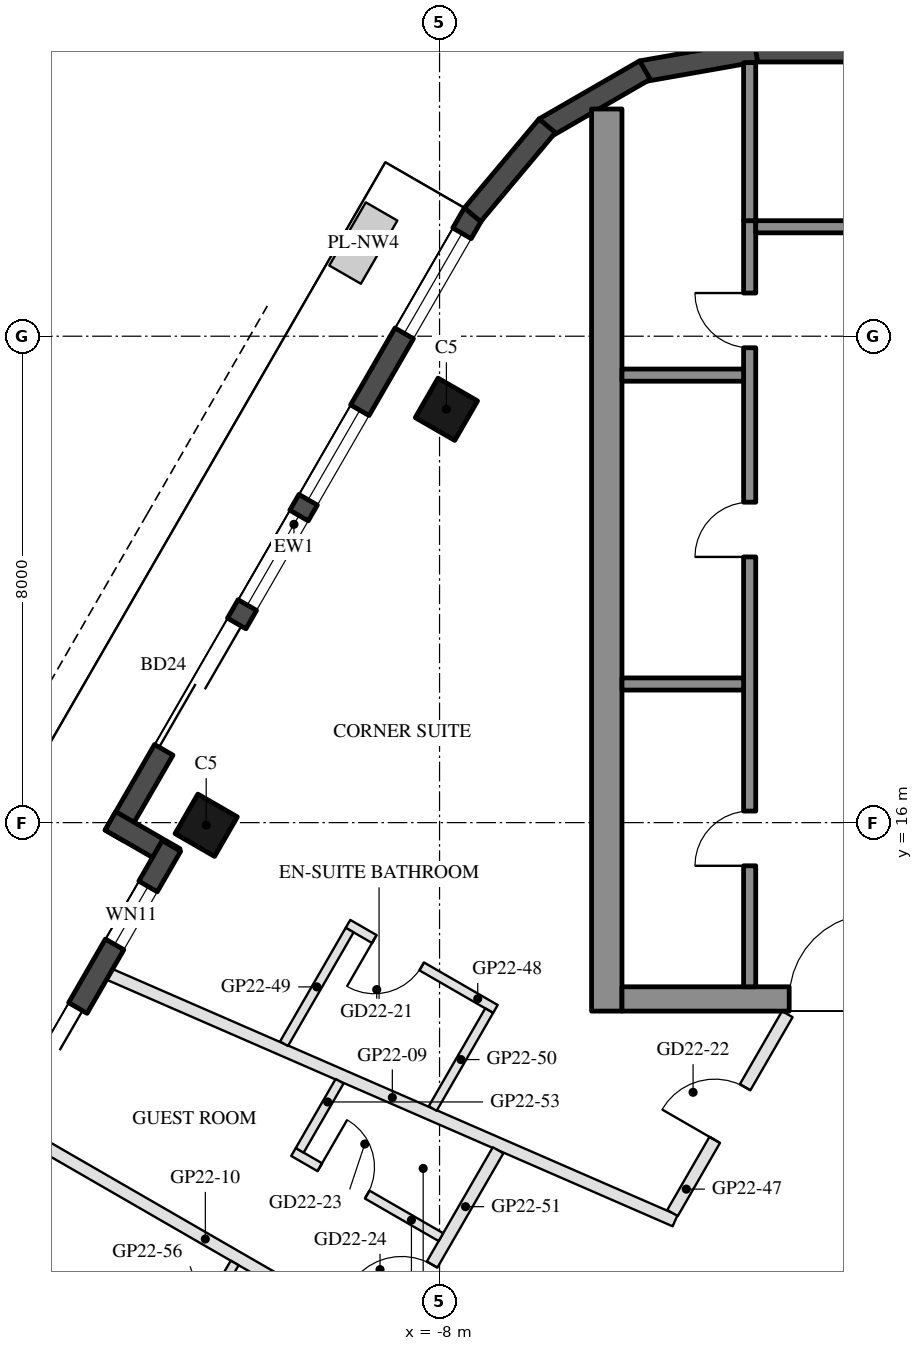
"""IFC4 building model, lengths in metres.
Left out: names, types, materials, properties, quantities, classifications, styles, units other than length and angle.
Written with IfcOpenShell. Run it as: python <this file> out.ifc"""

import sys

from ifc_helpers import new_model, si_unit, direction, frame, frame_2d, origin, origin_2d, place, context, subcontext, project, spatial, rectangle, hollow_rectangle, extrude, element, fill, save


model = new_model("IFC4")
c1 = context("Model", 3, precision=1e-05, world=origin(), true_north=direction((0.0, 1.0)))
c2 = subcontext(c1, "Body", "Model", "MODEL_VIEW")
j1 = project(units=[si_unit("LENGTHUNIT", "METRE"), si_unit("PLANEANGLEUNIT", "RADIAN")], contexts=[c1])
p1 = place(None, origin())
s1 = spatial("IfcSite", under=j1, at=p1, CompositionType="ELEMENT")
p2 = place(p1, origin())
s2 = spatial("IfcBuilding", under=s1, at=p2, CompositionType="ELEMENT")
p3 = place(p2, frame((0.0, 0.0, 224.3)))
s3 = spatial("IfcBuildingStorey", under=s2, at=p3, CompositionType="ELEMENT", Elevation=224.3)
for number, where, z_axis, x_axis in (
    (1, (-7.888, 22.798, 0.0), (0.0, 0.0, 1.0), (0.5, 0.866, 0.0)),
    (2, (-11.838, 15.957, 0.0), (0.0, 0.0, 1.0), (0.5, 0.866, 0.0)),
):
    element("IfcColumn", number, at=place(p3, frame(where, z_axis=z_axis, x_axis=x_axis)), inside=s3, PredefinedType="COLUMN", context=c2, shape_type="SweptSolid", body=[
        extrude(hollow_rectangle(XDim=0.75, YDim=0.75, WallThickness=0.035, at=origin_2d()), origin(), (0.0, 0.0, 1.0), 3.7),
    ])
p4 = place(p3, frame((-7.441, 26.022, 0.0), z_axis=(0.0, 0.0, 1.0), x_axis=(-0.499992533062, -0.86602971478, 0.0)))
e3 = element("IfcWall", 3, at=p4, inside=s3, PredefinedType="SOLIDWALL", context=c2, shape_type="SweptSolid", body=[
    extrude(rectangle(XDim=11.816, YDim=0.35, at=frame_2d((5.908, 0.0))), origin(), (0.0, 0.0, 1.0), 3.55),
])
p5 = place(p4, frame((0.381, 0.0, 0.3)))
e4 = element("IfcOpeningElement", 4, at=p5, cuts=e3, PredefinedType="OPENING", context=c2, shape_type="SweptSolid", body=[
    extrude(rectangle(XDim=1.9, YDim=2.65, at=frame_2d((0.95, 1.325))), frame((0.0, 0.185, 0.0), z_axis=(0.0, -1.0, 0.0), x_axis=(1.0, 0.0, 0.0)), (0.0, 0.0, 1.0), 0.37),
])
p6 = place(p4, frame((7.791, 0.0, 0.0)))
e5 = element("IfcOpeningElement", 5, at=p6, cuts=e3, PredefinedType="OPENING", context=c2, shape_type="SweptSolid", body=[
    extrude(rectangle(XDim=2.4, YDim=2.4, at=frame_2d((1.2, 1.2))), frame((0.0, 0.185, 0.0), z_axis=(0.0, -1.0, 0.0), x_axis=(1.0, 0.0, 0.0)), (0.0, 0.0, 1.0), 0.37),
])
p7 = place(p4, frame((3.741, 0.0, 0.3)))
e6 = element("IfcOpeningElement", 6, at=p7, cuts=e3, PredefinedType="OPENING", context=c2, shape_type="SweptSolid", body=[
    extrude(rectangle(XDim=1.7, YDim=2.65, at=frame_2d((0.85, 1.325))), frame((0.0, 0.185, 0.0), z_axis=(0.0, -1.0, 0.0), x_axis=(1.0, 0.0, 0.0)), (0.0, 0.0, 1.0), 0.37),
])
p8 = place(p4, frame((5.741, 0.0, 0.3)))
e7 = element("IfcOpeningElement", 7, at=p8, cuts=e3, PredefinedType="OPENING", context=c2, shape_type="SweptSolid", body=[
    extrude(rectangle(XDim=1.7, YDim=2.65, at=frame_2d((0.85, 1.325))), frame((0.0, 0.185, 0.0), z_axis=(0.0, -1.0, 0.0), x_axis=(1.0, 0.0, 0.0)), (0.0, 0.0, 1.0), 0.37),
])
p9 = place(p3, frame((-13.413, 16.029, 0.0), z_axis=(0.0, 0.0, 1.0), x_axis=(0.866005645448, -0.500034220881, 0.0)))
e8 = element("IfcWall", 8, at=p9, inside=s3, PredefinedType="SOLIDWALL", context=c2, shape_type="SweptSolid", body=[
    extrude(rectangle(XDim=1.22, YDim=0.35, at=frame_2d((0.61, 0.0))), origin(), (0.0, 0.0, 1.0), 3.55),
])
p10 = place(p3, frame((-12.409, 15.617, 0.0), z_axis=(0.0, 0.0, 1.0), x_axis=(-0.500003597184, -0.866023326939, 0.0)))
e9 = element("IfcWall", 9, at=p10, inside=s3, PredefinedType="SOLIDWALL", context=c2, shape_type="SweptSolid", body=[
    extrude(rectangle(XDim=6.74, YDim=0.35, at=frame_2d((3.37, 0.0))), origin(), (0.0, 0.0, 1.0), 3.55),
])
p11 = place(p10, frame((0.77, 0.0, 0.3)))
e10 = element("IfcOpeningElement", 10, at=p11, cuts=e9, PredefinedType="OPENING", context=c2, shape_type="SweptSolid", body=[
    extrude(rectangle(XDim=1.1, YDim=2.65, at=frame_2d((0.55, 1.325))), frame((0.0, 0.185, 0.0), z_axis=(0.0, -1.0, 0.0), x_axis=(1.0, 0.0, 0.0)), (0.0, 0.0, 1.0), 0.37),
])
p12 = place(p10, frame((3.079, 0.0, 0.0)))
e11 = element("IfcOpeningElement", 11, at=p12, cuts=e9, PredefinedType="OPENING", context=c2, shape_type="SweptSolid", body=[
    extrude(rectangle(XDim=1.5, YDim=2.4, at=frame_2d((0.75, 1.2))), frame((0.0, 0.185, 0.0), z_axis=(0.0, -1.0, 0.0), x_axis=(1.0, 0.0, 0.0)), (0.0, 0.0, 1.0), 0.37),
])
p13 = place(p3, frame((2.829, 28.685, 0.0), z_axis=(0.0, 0.0, 1.0), x_axis=(-1.0, 0.0, 0.0)))
e12 = element("IfcWall", 12, at=p13, inside=s3, PredefinedType="SOLIDWALL", context=c2, shape_type="SweptSolid", body=[
    extrude(rectangle(XDim=5.658, YDim=0.35, at=frame_2d((2.829, 0.0))), origin(), (0.0, 0.0, 1.0), 3.55),
])
for number, where, z_axis, x_axis in (
    (13, (-2.799, 28.688, 0.0), (0.0, 0.0, 1.0), (-0.985, -0.174, 0.0)),
    (14, (-4.623, 28.377, 0.0), (0.0, 0.0, 1.0), (-0.866, -0.5, 0.0)),
):
    element("IfcWall", number, at=place(p3, frame(where, z_axis=z_axis, x_axis=x_axis)), inside=s3, PredefinedType="SOLIDWALL", context=c2, shape_type="SweptSolid", body=[
        extrude(rectangle(XDim=1.91, YDim=0.35, at=frame_2d((0.955, 0.0))), origin(), (0.0, 0.0, 1.0), 3.55),
    ])
p14 = place(p3, frame((-6.23, 27.461, 0.0), z_axis=(0.0, 0.0, 1.0), x_axis=(-0.642808304945, -0.766027077259, 0.0)))
e15 = element("IfcWall", 15, at=p14, inside=s3, PredefinedType="SOLIDWALL", context=c2, shape_type="SweptSolid", body=[
    extrude(rectangle(XDim=1.91, YDim=0.35, at=frame_2d((0.955, 0.0))), origin(), (0.0, 0.0, 1.0), 3.55),
])
p15 = place(p3, frame((-5.25, 12.9, 0.0), z_axis=(0.0, 0.0, 1.0), x_axis=(0.0, 1.0, 0.0)))
e16 = element("IfcWall", 16, at=p15, inside=s3, PredefinedType="SHEAR", context=c2, shape_type="SweptSolid", body=[
    extrude(rectangle(XDim=14.837, YDim=0.5, at=frame_2d((7.418, 0.0))), origin(), (0.0, 0.0, 1.0), 3.5),
])
p16 = place(p3, frame((5.0, 13.1, 0.0), z_axis=(0.0, 0.0, 1.0), x_axis=(-1.0, 0.0, 0.0)))
e17 = element("IfcWall", 17, at=p16, inside=s3, PredefinedType="SHEAR", context=c2, shape_type="SweptSolid", body=[
    extrude(rectangle(XDim=10.0, YDim=0.4, at=frame_2d((5.0, 0.0))), origin(), (0.0, 0.0, 1.0), 3.5),
])
p17 = place(p16, frame((3.55, 0.0, 0.0)))
e18 = element("IfcOpeningElement", 18, at=p17, cuts=e17, PredefinedType="OPENING", context=c2, shape_type="SweptSolid", body=[
    extrude(rectangle(XDim=1.1, YDim=2.1, at=frame_2d((0.55, 1.05))), frame((0.0, 0.21, 0.0), z_axis=(0.0, -1.0, 0.0), x_axis=(1.0, 0.0, 0.0)), (0.0, 0.0, 1.0), 0.42),
])
p18 = place(p16, frame((5.85, 0.0, 0.0)))
e19 = element("IfcOpeningElement", 19, at=p18, cuts=e17, PredefinedType="OPENING", context=c2, shape_type="SweptSolid", body=[
    extrude(rectangle(XDim=1.4, YDim=2.1, at=frame_2d((0.7, 1.05))), frame((0.0, 0.21, 0.0), z_axis=(0.0, -1.0, 0.0), x_axis=(1.0, 0.0, 0.0)), (0.0, 0.0, 1.0), 0.42),
])
p19 = place(p3, frame((-2.9, 13.3, 0.0), z_axis=(0.0, 0.0, 1.0), x_axis=(0.0, 1.0, 0.0)))
e20 = element("IfcWall", 20, at=p19, inside=s3, PredefinedType="SHEAR", context=c2, shape_type="SweptSolid", body=[
    extrude(rectangle(XDim=12.6, YDim=0.2, at=frame_2d((6.3, 0.0))), origin(), (0.0, 0.0, 1.0), 3.5),
])
p20 = place(p19, frame((1.99, 0.0, 0.0)))
e21 = element("IfcOpeningElement", 21, at=p20, cuts=e20, PredefinedType="OPENING", context=c2, shape_type="SweptSolid", body=[
    extrude(rectangle(XDim=0.9, YDim=2.1, at=frame_2d((0.45, 1.05))), frame((0.0, 0.11, 0.0), z_axis=(0.0, -1.0, 0.0), x_axis=(1.0, 0.0, 0.0)), (0.0, 0.0, 1.0), 0.22),
])
p21 = place(p19, frame((7.07, 0.0, 0.0)))
e22 = element("IfcOpeningElement", 22, at=p21, cuts=e20, PredefinedType="OPENING", context=c2, shape_type="SweptSolid", body=[
    extrude(rectangle(XDim=0.9, YDim=2.1, at=frame_2d((0.45, 1.05))), frame((0.0, 0.11, 0.0), z_axis=(0.0, -1.0, 0.0), x_axis=(1.0, 0.0, 0.0)), (0.0, 0.0, 1.0), 0.22),
])
p22 = place(p19, frame((10.51, 0.0, 0.0)))
e23 = element("IfcOpeningElement", 23, at=p22, cuts=e20, PredefinedType="OPENING", context=c2, shape_type="SweptSolid", body=[
    extrude(rectangle(XDim=0.9, YDim=2.1, at=frame_2d((0.45, 1.05))), frame((0.0, 0.11, 0.0), z_axis=(0.0, -1.0, 0.0), x_axis=(1.0, 0.0, 0.0)), (0.0, 0.0, 1.0), 0.22),
])
p23 = place(p3, frame((-0.4, 25.8, 0.0), z_axis=(0.0, 0.0, 1.0), x_axis=(-1.0, 0.0, 0.0)))
e24 = element("IfcWall", 24, at=p23, inside=s3, PredefinedType="SHEAR", context=c2, shape_type="SweptSolid", body=[
    extrude(rectangle(XDim=2.4, YDim=0.2, at=frame_2d((1.2, 0.0))), origin(), (0.0, 0.0, 1.0), 3.5),
])
for number, where, z_axis, x_axis in (
    (25, (-3.0, 18.28, 0.0), (0.0, 0.0, 1.0), (-1.0, 0.0, 0.0)),
    (26, (-3.0, 23.36, 0.0), (0.0, 0.0, 1.0), (-1.0, 0.0, 0.0)),
):
    element("IfcWall", number, at=place(p3, frame(where, z_axis=z_axis, x_axis=x_axis)), inside=s3, PredefinedType="SHEAR", context=c2, shape_type="SweptSolid", body=[
        extrude(rectangle(XDim=2.0, YDim=0.2, at=frame_2d((1.0, 0.0))), origin(), (0.0, 0.0, 1.0), 3.5),
    ])
p24 = place(p3, frame((-2.9, 25.9, 0.0), z_axis=(0.0, 0.0, 1.0), x_axis=(0.0, 1.0, 0.0)))
e27 = element("IfcWall", 27, at=p24, inside=s3, PredefinedType="SHEAR", context=c2, shape_type="SweptSolid", body=[
    extrude(rectangle(XDim=2.6, YDim=0.2, at=frame_2d((1.3, 0.0))), origin(), (0.0, 0.0, 1.0), 3.5),
])
p25 = place(p3, frame((-13.427, 13.504, 0.0), z_axis=(0.0, 0.0, 1.0), x_axis=(0.916759471343, -0.399439697204, 0.0)))
e28 = element("IfcWall", 28, at=p25, inside=s3, PredefinedType="PARTITIONING", context=c2, shape_type="SweptSolid", body=[
    extrude(rectangle(XDim=10.144, YDim=0.2, at=frame_2d((5.072, 0.0))), origin(), (0.0, 0.0, 1.0), 3.06),
])
p26 = place(p3, frame((-14.917, 10.922, 0.0), z_axis=(0.0, 0.0, 1.0), x_axis=(0.866019052629, -0.500011000363, 0.0)))
e29 = element("IfcWall", 29, at=p26, inside=s3, PredefinedType="PARTITIONING", context=c2, shape_type="SweptSolid", body=[
    extrude(rectangle(XDim=7.08, YDim=0.2, at=frame_2d((3.54, 0.0))), origin(), (0.0, 0.0, 1.0), 3.06),
])
p27 = place(p3, frame((-4.169, 9.58, 0.0), z_axis=(0.0, 0.0, 1.0), x_axis=(0.499991068497, 0.866030560329, 0.0)))
e30 = element("IfcWall", 30, at=p27, inside=s3, PredefinedType="PARTITIONING", context=c2, shape_type="SweptSolid", body=[
    extrude(rectangle(XDim=3.776, YDim=0.2, at=frame_2d((1.888, 0.0))), origin(), (0.0, 0.0, 1.0), 2.95),
])
p28 = place(p27, frame((1.388, 0.0, 0.0)))
e31 = element("IfcOpeningElement", 31, at=p28, cuts=e30, PredefinedType="OPENING", context=c2, shape_type="SweptSolid", body=[
    extrude(rectangle(XDim=1.0, YDim=2.1, at=frame_2d((0.5, 1.05))), frame((0.0, 0.11, 0.0), z_axis=(0.0, -1.0, 0.0), x_axis=(1.0, 0.0, 0.0)), (0.0, 0.0, 1.0), 0.22),
])
p29 = place(p3, frame((-7.081, 12.935, 0.0), z_axis=(0.0, 0.0, 1.0), x_axis=(-0.866056369097, 0.49994636267, 0.0)))
e32 = element("IfcWall", 32, at=p29, inside=s3, PredefinedType="PARTITIONING", context=c2, shape_type="SweptSolid", body=[
    extrude(rectangle(XDim=2.8, YDim=0.15, at=frame_2d((1.4, 0.0))), origin(), (0.0, 0.0, 1.0), 3.55),
])
p30 = place(p29, frame((1.4, 0.0, 0.0)))
e33 = element("IfcOpeningElement", 33, at=p30, cuts=e32, PredefinedType="OPENING", context=c2, shape_type="SweptSolid", body=[
    extrude(rectangle(XDim=0.9, YDim=2.1, at=frame_2d((0.45, 1.05))), frame((0.0, 0.085, 0.0), z_axis=(0.0, -1.0, 0.0), x_axis=(1.0, 0.0, 0.0)), (0.0, 0.0, 1.0), 0.17),
])
p31 = place(p3, frame((-9.479, 14.233, 0.0), z_axis=(0.0, 0.0, 1.0), x_axis=(-0.499983569942, -0.866034889475, 0.0)))
e34 = element("IfcWall", 34, at=p31, inside=s3, PredefinedType="PARTITIONING", context=c2, shape_type="SweptSolid", body=[
    extrude(rectangle(XDim=2.158, YDim=0.15, at=frame_2d((1.079, 0.0))), origin(), (0.0, 0.0, 1.0), 3.55),
])
p32 = place(p3, frame((-7.184, 12.908, 0.0), z_axis=(0.0, 0.0, 1.0), x_axis=(-0.49995366312, -0.866052154742, 0.0)))
e35 = element("IfcWall", 35, at=p32, inside=s3, PredefinedType="PARTITIONING", context=c2, shape_type="SweptSolid", body=[
    extrude(rectangle(XDim=1.859, YDim=0.15, at=frame_2d((0.929, 0.0))), origin(), (0.0, 0.0, 1.0), 3.55),
])
p33 = place(p3, frame((-8.823, 7.519, 0.0), z_axis=(0.0, 0.0, 1.0), x_axis=(0.500036104519, 0.866004557827, 0.0)))
e36 = element("IfcWall", 36, at=p33, inside=s3, PredefinedType="PARTITIONING", context=c2, shape_type="SweptSolid", body=[
    extrude(rectangle(XDim=3.571, YDim=0.2, at=frame_2d((1.786, 0.0))), origin(), (0.0, 0.0, 1.0), 2.95),
])
p34 = place(p33, frame((0.4, 0.0, 0.0)))
e37 = element("IfcOpeningElement", 37, at=p34, cuts=e36, PredefinedType="OPENING", context=c2, shape_type="SweptSolid", body=[
    extrude(rectangle(XDim=1.0, YDim=2.1, at=frame_2d((0.5, 1.05))), frame((0.0, 0.11, 0.0), z_axis=(0.0, -1.0, 0.0), x_axis=(1.0, 0.0, 0.0)), (0.0, 0.0, 1.0), 0.22),
])
p35 = place(p3, frame((-10.402, 10.583, 0.0), z_axis=(0.0, 0.0, 1.0), x_axis=(0.866034573852, -0.49998411664, 0.0)))
e38 = element("IfcWall", 38, at=p35, inside=s3, PredefinedType="PARTITIONING", context=c2, shape_type="SweptSolid", body=[
    extrude(rectangle(XDim=2.8, YDim=0.15, at=frame_2d((1.4, 0.0))), origin(), (0.0, 0.0, 1.0), 2.95),
])
p36 = place(p35, frame((0.5, 0.0, 0.0)))
e39 = element("IfcOpeningElement", 39, at=p36, cuts=e38, PredefinedType="OPENING", context=c2, shape_type="SweptSolid", body=[
    extrude(rectangle(XDim=0.9, YDim=2.1, at=frame_2d((0.45, 1.05))), frame((0.0, 0.085, 0.0), z_axis=(0.0, -1.0, 0.0), x_axis=(1.0, 0.0, 0.0)), (0.0, 0.0, 1.0), 0.17),
])
p37 = place(p3, frame((-9.644, 11.747, 0.0), z_axis=(0.0, 0.0, 1.0), x_axis=(-0.499899541988, -0.866083395476, 0.0)))
e40 = element("IfcWall", 40, at=p37, inside=s3, PredefinedType="PARTITIONING", context=c2, shape_type="SweptSolid", body=[
    extrude(rectangle(XDim=1.313, YDim=0.15, at=frame_2d((0.656, 0.0))), origin(), (0.0, 0.0, 1.0), 2.95),
])
p38 = place(p3, frame((-11.369, 8.758, 0.0), z_axis=(0.0, 0.0, 1.0), x_axis=(-0.500042316284, -0.866000971088, 0.0)))
e41 = element("IfcWall", 41, at=p38, inside=s3, PredefinedType="PARTITIONING", context=c2, shape_type="SweptSolid", body=[
    extrude(rectangle(XDim=1.85, YDim=0.15, at=frame_2d((0.925, 0.0))), origin(), (0.0, 0.0, 1.0), 2.95),
])
p39 = place(p5, origin())
e42 = element("IfcWindow", 42, at=p39, inside=s3, PartitioningType="SINGLE_PANEL", PredefinedType="WINDOW", context=c2, shape_type="SweptSolid", body=[
    extrude(rectangle(XDim=1.9, YDim=2.65, at=frame_2d((0.95, 1.325))), frame((0.0, 0.03, 0.0), z_axis=(0.0, -1.0, 0.0), x_axis=(1.0, 0.0, 0.0)), (0.0, 0.0, 1.0), 0.06),
])
fill(e4, e42)
p40 = place(p6, frame((2.4, 0.0, 0.0), z_axis=(0.0, 0.0, 1.0), x_axis=(-1.0, 0.0, 0.0)))
e43 = element("IfcDoor", 43, at=p40, inside=s3, OperationType="SLIDING_TO_LEFT", PredefinedType="DOOR", context=c2, shape_type="SweptSolid", body=[
    extrude(rectangle(XDim=2.4, YDim=2.4, at=frame_2d((1.2, 1.2))), frame((0.0, 0.025, 0.0), z_axis=(0.0, -1.0, 0.0), x_axis=(1.0, 0.0, 0.0)), (0.0, 0.0, 1.0), 0.05),
])
fill(e5, e43)
p41 = place(p7, origin())
e44 = element("IfcWindow", 44, at=p41, inside=s3, PartitioningType="SINGLE_PANEL", PredefinedType="WINDOW", context=c2, shape_type="SweptSolid", body=[
    extrude(rectangle(XDim=1.7, YDim=2.65, at=frame_2d((0.85, 1.325))), frame((0.0, 0.03, 0.0), z_axis=(0.0, -1.0, 0.0), x_axis=(1.0, 0.0, 0.0)), (0.0, 0.0, 1.0), 0.06),
])
fill(e6, e44)
p42 = place(p8, origin())
e45 = element("IfcWindow", 45, at=p42, inside=s3, PartitioningType="SINGLE_PANEL", PredefinedType="WINDOW", context=c2, shape_type="SweptSolid", body=[
    extrude(rectangle(XDim=1.7, YDim=2.65, at=frame_2d((0.85, 1.325))), frame((0.0, 0.03, 0.0), z_axis=(0.0, -1.0, 0.0), x_axis=(1.0, 0.0, 0.0)), (0.0, 0.0, 1.0), 0.06),
])
fill(e7, e45)
p43 = place(p11, origin())
e46 = element("IfcWindow", 46, at=p43, inside=s3, PartitioningType="SINGLE_PANEL", PredefinedType="WINDOW", context=c2, shape_type="SweptSolid", body=[
    extrude(rectangle(XDim=1.1, YDim=2.65, at=frame_2d((0.55, 1.325))), frame((0.0, 0.03, 0.0), z_axis=(0.0, -1.0, 0.0), x_axis=(1.0, 0.0, 0.0)), (0.0, 0.0, 1.0), 0.06),
])
fill(e10, e46)
p44 = place(p12, frame((1.5, 0.0, 0.0), z_axis=(0.0, 0.0, 1.0), x_axis=(-1.0, 0.0, 0.0)))
e47 = element("IfcDoor", 47, at=p44, inside=s3, OperationType="SLIDING_TO_LEFT", PredefinedType="DOOR", context=c2, shape_type="SweptSolid", body=[
    extrude(rectangle(XDim=1.5, YDim=2.4, at=frame_2d((0.75, 1.2))), frame((0.0, 0.025, 0.0), z_axis=(0.0, -1.0, 0.0), x_axis=(1.0, 0.0, 0.0)), (0.0, 0.0, 1.0), 0.05),
])
fill(e11, e47)
p45 = place(p20, origin())
e48 = element("IfcDoor", 48, at=p45, inside=s3, OperationType="SINGLE_SWING_LEFT", PredefinedType="DOOR", context=c2, shape_type="SweptSolid", body=[
    extrude(rectangle(XDim=0.9, YDim=2.1, at=frame_2d((0.45, 1.05))), frame((0.0, 0.025, 0.0), z_axis=(0.0, -1.0, 0.0), x_axis=(1.0, 0.0, 0.0)), (0.0, 0.0, 1.0), 0.05),
])
fill(e21, e48)
p46 = place(p21, origin())
e49 = element("IfcDoor", 49, at=p46, inside=s3, OperationType="SINGLE_SWING_LEFT", PredefinedType="DOOR", context=c2, shape_type="SweptSolid", body=[
    extrude(rectangle(XDim=0.9, YDim=2.1, at=frame_2d((0.45, 1.05))), frame((0.0, 0.025, 0.0), z_axis=(0.0, -1.0, 0.0), x_axis=(1.0, 0.0, 0.0)), (0.0, 0.0, 1.0), 0.05),
])
fill(e22, e49)
p47 = place(p22, origin())
e50 = element("IfcDoor", 50, at=p47, inside=s3, OperationType="SINGLE_SWING_RIGHT", PredefinedType="DOOR", context=c2, shape_type="SweptSolid", body=[
    extrude(rectangle(XDim=0.9, YDim=2.1, at=frame_2d((0.45, 1.05))), frame((0.0, 0.025, 0.0), z_axis=(0.0, -1.0, 0.0), x_axis=(1.0, 0.0, 0.0)), (0.0, 0.0, 1.0), 0.05),
])
fill(e23, e50)
p48 = place(p18, frame((1.4, 0.0, 0.0), z_axis=(0.0, 0.0, 1.0), x_axis=(-1.0, 0.0, 0.0)))
e51 = element("IfcDoor", 51, at=p48, inside=s3, OperationType="DOUBLE_DOOR_SINGLE_SWING", PredefinedType="DOOR", context=c2, shape_type="SweptSolid", body=[
    extrude(rectangle(XDim=1.4, YDim=2.1, at=frame_2d((0.7, 1.05))), frame((0.0, 0.025, 0.0), z_axis=(0.0, -1.0, 0.0), x_axis=(1.0, 0.0, 0.0)), (0.0, 0.0, 1.0), 0.05),
])
fill(e19, e51)
p49 = place(p30, origin())
e52 = element("IfcDoor", 52, at=p49, inside=s3, OperationType="SINGLE_SWING_RIGHT", PredefinedType="DOOR", context=c2, shape_type="SweptSolid", body=[
    extrude(rectangle(XDim=0.9, YDim=2.1, at=frame_2d((0.45, 1.05))), frame((0.0, 0.025, 0.0), z_axis=(0.0, -1.0, 0.0), x_axis=(1.0, 0.0, 0.0)), (0.0, 0.0, 1.0), 0.05),
])
fill(e33, e52)
p50 = place(p28, origin())
e53 = element("IfcDoor", 53, at=p50, inside=s3, OperationType="SINGLE_SWING_LEFT", PredefinedType="DOOR", context=c2, shape_type="SweptSolid", body=[
    extrude(rectangle(XDim=1.0, YDim=2.1, at=frame_2d((0.5, 1.05))), frame((0.0, 0.025, 0.0), z_axis=(0.0, -1.0, 0.0), x_axis=(1.0, 0.0, 0.0)), (0.0, 0.0, 1.0), 0.05),
])
fill(e31, e53)
p51 = place(p36, origin())
e54 = element("IfcDoor", 54, at=p51, inside=s3, OperationType="SINGLE_SWING_LEFT", PredefinedType="DOOR", context=c2, shape_type="SweptSolid", body=[
    extrude(rectangle(XDim=0.9, YDim=2.1, at=frame_2d((0.45, 1.05))), frame((0.0, 0.025, 0.0), z_axis=(0.0, -1.0, 0.0), x_axis=(1.0, 0.0, 0.0)), (0.0, 0.0, 1.0), 0.05),
])
fill(e39, e54)
p52 = place(p34, origin())
e55 = element("IfcDoor", 55, at=p52, inside=s3, OperationType="SINGLE_SWING_LEFT", PredefinedType="DOOR", context=c2, shape_type="SweptSolid", body=[
    extrude(rectangle(XDim=1.0, YDim=2.1, at=frame_2d((0.5, 1.05))), frame((0.0, 0.025, 0.0), z_axis=(0.0, -1.0, 0.0), x_axis=(1.0, 0.0, 0.0)), (0.0, 0.0, 1.0), 0.05),
])
fill(e37, e55)
save(model, sys.argv[1])
